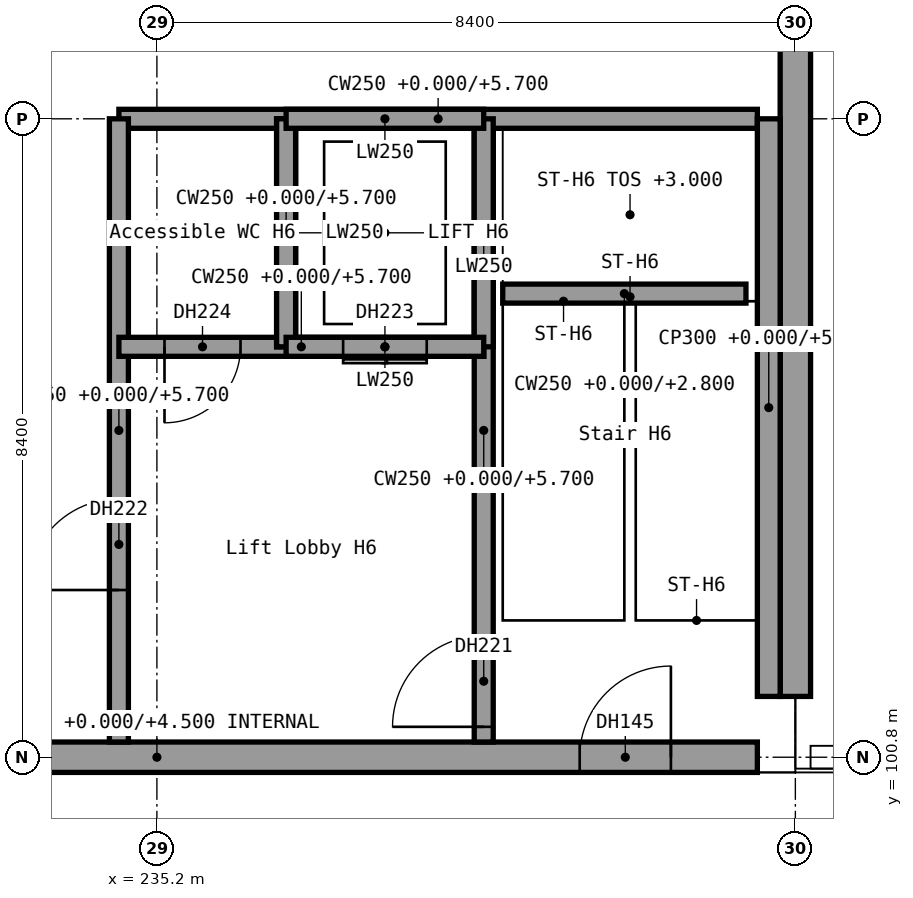
"""IFC4 building model, lengths in metres.
Left out: names, types, materials, properties, quantities, classifications, styles, units other than length and angle.
Written with IfcOpenShell. Run it as: python <this file> out.ifc"""

import sys

from ifc_helpers import new_model, si_unit, direction, frame, frame_2d, origin, origin_2d, place, context, subcontext, project, spatial, rectangle, extrude, element, fill, save


model = new_model("IFC4")
c1 = context("Model", 3, precision=1e-05, world=origin(), true_north=direction((0.0, 1.0)))
c2 = subcontext(c1, "Body", "Model", "MODEL_VIEW")
j1 = project(units=[si_unit("LENGTHUNIT", "METRE"), si_unit("PLANEANGLEUNIT", "RADIAN")], contexts=[c1])
p1 = place(None, origin())
s1 = spatial("IfcSite", under=j1, at=p1, CompositionType="ELEMENT")
p2 = place(p1, origin())
s2 = spatial("IfcBuilding", under=s1, at=p2, CompositionType="ELEMENT")
p3 = place(p2, origin())
s3 = spatial("IfcBuildingStorey", under=s2, at=p3, CompositionType="ELEMENT", Elevation=0.0)
p4 = place(p3, frame((243.6, 100.8, 0.0), z_axis=(0.0, 0.0, 1.0), x_axis=(1.0, 0.0, 0.0)))
e1 = element("IfcColumn", 1, at=p4, inside=s3, PredefinedType="COLUMN", context=c2, shape_type="SweptSolid", body=[
    extrude(rectangle(XDim=1.0, YDim=1.6, at=origin_2d()), origin(), (0.0, 0.0, 1.0), 6.0),
])
p5 = place(p3, frame((227.3, 100.8, 0.0), z_axis=(0.0, 0.0, 1.0), x_axis=(1.0, 0.0, 0.0)))
e2 = element("IfcWall", 2, at=p5, inside=s3, PredefinedType="STANDARD", context=c2, shape_type="SweptSolid", body=[
    extrude(rectangle(XDim=15.8, YDim=0.4, at=frame_2d((7.9, 0.0))), origin(), (0.0, 0.0, 1.0), 4.5),
])
p6 = place(p5, frame((13.462, 0.0, 0.0)))
e3 = element("IfcOpeningElement", 3, at=p6, cuts=e2, PredefinedType="OPENING", context=c2, shape_type="SweptSolid", body=[
    extrude(rectangle(XDim=1.2, YDim=2.1, at=frame_2d((0.6, 1.05))), frame((0.0, 0.2, 0.0), z_axis=(0.0, -1.0, 0.0), x_axis=(1.0, 0.0, 0.0)), (0.0, 0.0, 1.0), 0.4),
])
p7 = place(p3, frame((243.6, 101.6, 0.0), z_axis=(0.0, 0.0, 1.0), x_axis=(0.0, 1.0, 0.0)))
e4 = element("IfcWall", 4, at=p7, inside=s3, PredefinedType="SHEAR", context=c2, shape_type="SweptSolid", body=[
    extrude(rectangle(XDim=99.2, YDim=0.4, at=frame_2d((49.6, 0.0))), origin(), (0.0, 0.0, 1.0), 6.0),
])
p8 = place(p7, frame((10.9, 0.0, 0.0)))
e5 = element("IfcOpeningElement", 5, at=p8, cuts=e4, PredefinedType="OPENING", context=c2, shape_type="SweptSolid", body=[
    extrude(rectangle(XDim=1.8, YDim=2.4, at=frame_2d((0.9, 1.2))), frame((0.0, 0.2, 0.0), z_axis=(0.0, -1.0, 0.0), x_axis=(1.0, 0.0, 0.0)), (0.0, 0.0, 1.0), 0.4),
])
p9 = place(p7, frame((27.7, 0.0, 0.0)))
e6 = element("IfcOpeningElement", 6, at=p9, cuts=e4, PredefinedType="OPENING", context=c2, shape_type="SweptSolid", body=[
    extrude(rectangle(XDim=1.8, YDim=2.4, at=frame_2d((0.9, 1.2))), frame((0.0, 0.2, 0.0), z_axis=(0.0, -1.0, 0.0), x_axis=(1.0, 0.0, 0.0)), (0.0, 0.0, 1.0), 0.4),
])
p10 = place(p7, frame((44.5, 0.0, 0.0)))
e7 = element("IfcOpeningElement", 7, at=p10, cuts=e4, PredefinedType="OPENING", context=c2, shape_type="SweptSolid", body=[
    extrude(rectangle(XDim=1.8, YDim=2.4, at=frame_2d((0.9, 1.2))), frame((0.0, 0.2, 0.0), z_axis=(0.0, -1.0, 0.0), x_axis=(1.0, 0.0, 0.0)), (0.0, 0.0, 1.0), 0.4),
])
p11 = place(p7, frame((61.3, 0.0, 0.0)))
e8 = element("IfcOpeningElement", 8, at=p11, cuts=e4, PredefinedType="OPENING", context=c2, shape_type="SweptSolid", body=[
    extrude(rectangle(XDim=1.8, YDim=2.4, at=frame_2d((0.9, 1.2))), frame((0.0, 0.2, 0.0), z_axis=(0.0, -1.0, 0.0), x_axis=(1.0, 0.0, 0.0)), (0.0, 0.0, 1.0), 0.4),
])
p12 = place(p7, frame((78.1, 0.0, 0.0)))
e9 = element("IfcOpeningElement", 9, at=p12, cuts=e4, PredefinedType="OPENING", context=c2, shape_type="SweptSolid", body=[
    extrude(rectangle(XDim=1.8, YDim=2.4, at=frame_2d((0.9, 1.2))), frame((0.0, 0.2, 0.0), z_axis=(0.0, -1.0, 0.0), x_axis=(1.0, 0.0, 0.0)), (0.0, 0.0, 1.0), 0.4),
])
p13 = place(p3, frame((243.8, 100.8, 6.0), z_axis=(0.0, 0.0, 1.0), x_axis=(1.0, 0.0, 0.0)))
e10 = element("IfcWall", 10, at=p13, inside=s3, PredefinedType="PARAPET", context=c2, shape_type="SweptSolid", body=[
    extrude(rectangle(XDim=16.45, YDim=0.3, at=frame_2d((8.225, 0.0))), origin(), (0.0, 0.0, 1.0), 1.2),
])
p14 = place(p3, frame((239.5, 101.0, 0.0), z_axis=(0.0, 0.0, 1.0), x_axis=(0.0, 1.0, 0.0)))
e11 = element("IfcWall", 11, at=p14, inside=s3, PredefinedType="SHEAR", context=c2, shape_type="SweptSolid", body=[
    extrude(rectangle(XDim=8.2, YDim=0.25, at=frame_2d((4.1, 0.0))), origin(), (0.0, 0.0, 1.0), 5.7),
])
p15 = place(p14, frame((0.2, 0.0, 0.0)))
e12 = element("IfcOpeningElement", 12, at=p15, cuts=e11, PredefinedType="OPENING", context=c2, shape_type="SweptSolid", body=[
    extrude(rectangle(XDim=1.2, YDim=2.1, at=frame_2d((0.6, 1.05))), frame((0.0, 0.125, 0.0), z_axis=(0.0, -1.0, 0.0), x_axis=(1.0, 0.0, 0.0)), (0.0, 0.0, 1.0), 0.25),
])
p16 = place(p3, frame((243.1, 109.2, 0.0), z_axis=(0.0, 0.0, 1.0), x_axis=(-1.0, 0.0, 0.0)))
e13 = element("IfcWall", 13, at=p16, inside=s3, PredefinedType="SHEAR", context=c2, shape_type="SweptSolid", body=[
    extrude(rectangle(XDim=8.4, YDim=0.25, at=frame_2d((4.2, 0.0))), origin(), (0.0, 0.0, 1.0), 5.7),
])
p17 = place(p3, frame((234.7, 101.0, 0.0), z_axis=(0.0, 0.0, 1.0), x_axis=(0.0, 1.0, 0.0)))
e14 = element("IfcWall", 14, at=p17, inside=s3, PredefinedType="SHEAR", context=c2, shape_type="SweptSolid", body=[
    extrude(rectangle(XDim=8.2, YDim=0.25, at=frame_2d((4.1, 0.0))), origin(), (0.0, 0.0, 1.0), 5.7),
])
p18 = place(p17, frame((2.0, 0.0, 0.0)))
e15 = element("IfcOpeningElement", 15, at=p18, cuts=e14, PredefinedType="OPENING", context=c2, shape_type="SweptSolid", body=[
    extrude(rectangle(XDim=1.2, YDim=2.1, at=frame_2d((0.6, 1.05))), frame((0.0, 0.125, 0.0), z_axis=(0.0, -1.0, 0.0), x_axis=(1.0, 0.0, 0.0)), (0.0, 0.0, 1.0), 0.25),
])
p19 = place(p3, frame((239.5, 106.2, 0.0), z_axis=(0.0, 0.0, 1.0), x_axis=(-1.0, 0.0, 0.0)))
e16 = element("IfcWall", 16, at=p19, inside=s3, PredefinedType="SHEAR", context=c2, shape_type="SweptSolid", body=[
    extrude(rectangle(XDim=4.8, YDim=0.25, at=frame_2d((2.4, 0.0))), origin(), (0.0, 0.0, 1.0), 5.7),
])
p20 = place(p19, frame((0.75, 0.0, 0.0)))
e17 = element("IfcOpeningElement", 17, at=p20, cuts=e16, PredefinedType="OPENING", context=c2, shape_type="SweptSolid", body=[
    extrude(rectangle(XDim=1.1, YDim=2.1, at=frame_2d((0.55, 1.05))), frame((0.0, 0.125, 0.0), z_axis=(0.0, -1.0, 0.0), x_axis=(1.0, 0.0, 0.0)), (0.0, 0.0, 1.0), 0.25),
])
p21 = place(p19, frame((3.2, 0.0, 0.0)))
e18 = element("IfcOpeningElement", 18, at=p21, cuts=e16, PredefinedType="OPENING", context=c2, shape_type="SweptSolid", body=[
    extrude(rectangle(XDim=1.0, YDim=2.1, at=frame_2d((0.5, 1.05))), frame((0.0, 0.125, 0.0), z_axis=(0.0, -1.0, 0.0), x_axis=(1.0, 0.0, 0.0)), (0.0, 0.0, 1.0), 0.25),
])
p22 = place(p3, frame((236.9, 106.2, 0.0), z_axis=(0.0, 0.0, 1.0), x_axis=(0.0, 1.0, 0.0)))
e19 = element("IfcWall", 19, at=p22, inside=s3, PredefinedType="SHEAR", context=c2, shape_type="SweptSolid", body=[
    extrude(rectangle(XDim=3.0, YDim=0.25, at=frame_2d((1.5, 0.0))), origin(), (0.0, 0.0, 1.0), 5.7),
])
p23 = place(p3, frame((243.25, 101.6, 0.0), z_axis=(0.0, 0.0, 1.0), x_axis=(0.0, 1.0, 0.0)))
e20 = element("IfcWall", 20, at=p23, inside=s3, PredefinedType="SHEAR", context=c2, shape_type="SweptSolid", body=[
    extrude(rectangle(XDim=7.6, YDim=0.3, at=frame_2d((3.8, 0.0))), origin(), (0.0, 0.0, 1.0), 5.7),
])
p24 = place(p3, frame((242.95, 106.9, 0.0), z_axis=(0.0, 0.0, 1.0), x_axis=(-1.0, 0.0, 0.0)))
e21 = element("IfcWall", 21, at=p24, inside=s3, PredefinedType="SHEAR", context=c2, shape_type="SweptSolid", body=[
    extrude(rectangle(XDim=3.2, YDim=0.25, at=frame_2d((1.6, 0.0))), origin(), (0.0, 0.0, 1.0), 2.8),
])
for number, where, z_axis, x_axis in (
    (22, (239.5, 106.2, -1.4), (0.0, 0.0, 1.0), (0.0, 1.0, 0.0)),
    (23, (236.9, 106.2, -1.4), (0.0, 0.0, 1.0), (0.0, 1.0, 0.0)),
):
    element("IfcWall", number, at=place(p3, frame(where, z_axis=z_axis, x_axis=x_axis)), inside=s3, PredefinedType="SHEAR", context=c2, shape_type="SweptSolid", body=[
        extrude(rectangle(XDim=3.0, YDim=0.25, at=frame_2d((1.5, 0.0))), origin(), (0.0, 0.0, 1.0), 1.4),
    ])
for number, where, z_axis, x_axis in (
    (24, (239.5, 106.2, -1.4), (0.0, 0.0, 1.0), (-1.0, 0.0, 0.0)),
    (25, (239.5, 109.2, -1.4), (0.0, 0.0, 1.0), (-1.0, 0.0, 0.0)),
):
    element("IfcWall", number, at=place(p3, frame(where, z_axis=z_axis, x_axis=x_axis)), inside=s3, PredefinedType="SHEAR", context=c2, shape_type="SweptSolid", body=[
        extrude(rectangle(XDim=2.6, YDim=0.25, at=frame_2d((1.3, 0.0))), origin(), (0.0, 0.0, 1.0), 1.4),
    ])
p25 = place(p6, origin())
e26 = element("IfcDoor", 26, at=p25, inside=s3, OperationType="SINGLE_SWING_RIGHT", PredefinedType="DOOR", context=c2, shape_type="SweptSolid", body=[
    extrude(rectangle(XDim=1.2, YDim=2.1, at=frame_2d((0.6, 1.05))), frame((0.0, 0.025, 0.0), z_axis=(0.0, -1.0, 0.0), x_axis=(1.0, 0.0, 0.0)), (0.0, 0.0, 1.0), 0.05),
])
fill(e3, e26)
p26 = place(p15, origin())
e27 = element("IfcDoor", 27, at=p26, inside=s3, OperationType="SINGLE_SWING_LEFT", PredefinedType="DOOR", context=c2, shape_type="SweptSolid", body=[
    extrude(rectangle(XDim=1.2, YDim=2.1, at=frame_2d((0.6, 1.05))), frame((0.0, 0.025, 0.0), z_axis=(0.0, -1.0, 0.0), x_axis=(1.0, 0.0, 0.0)), (0.0, 0.0, 1.0), 0.05),
])
fill(e12, e27)
p27 = place(p18, origin())
e28 = element("IfcDoor", 28, at=p27, inside=s3, OperationType="SINGLE_SWING_LEFT", PredefinedType="DOOR", context=c2, shape_type="SweptSolid", body=[
    extrude(rectangle(XDim=1.2, YDim=2.1, at=frame_2d((0.6, 1.05))), frame((0.0, 0.025, 0.0), z_axis=(0.0, -1.0, 0.0), x_axis=(1.0, 0.0, 0.0)), (0.0, 0.0, 1.0), 0.05),
])
fill(e15, e28)
p28 = place(p20, origin())
e29 = element("IfcDoor", 29, at=p28, inside=s3, OperationType="DOUBLE_DOOR_SLIDING", PredefinedType="DOOR", context=c2, shape_type="SweptSolid", body=[
    extrude(rectangle(XDim=1.1, YDim=2.1, at=frame_2d((0.55, 1.05))), frame((0.0, 0.025, 0.0), z_axis=(0.0, -1.0, 0.0), x_axis=(1.0, 0.0, 0.0)), (0.0, 0.0, 1.0), 0.05),
])
fill(e17, e29)
p29 = place(p21, origin())
e30 = element("IfcDoor", 30, at=p29, inside=s3, OperationType="SINGLE_SWING_RIGHT", PredefinedType="DOOR", context=c2, shape_type="SweptSolid", body=[
    extrude(rectangle(XDim=1.0, YDim=2.1, at=frame_2d((0.5, 1.05))), frame((0.0, 0.025, 0.0), z_axis=(0.0, -1.0, 0.0), x_axis=(1.0, 0.0, 0.0)), (0.0, 0.0, 1.0), 0.05),
])
fill(e18, e30)
save(model, sys.argv[1])
